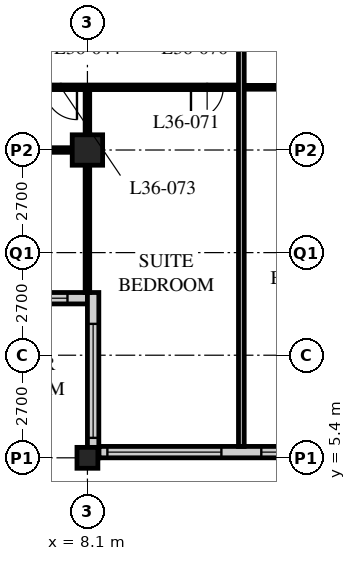
"""IFC4 building model, lengths in metres.
Left out: names, types, materials, properties, quantities, classifications, styles, units other than length and angle.
Written with IfcOpenShell. Run it as: python <this file> out.ifc"""

import sys

from ifc_helpers import new_model, si_unit, direction, frame, frame_2d, origin, origin_2d, place, context, subcontext, project, spatial, rectangle, hollow_rectangle, extrude, element, fill, save


model = new_model("IFC4")
c1 = context("Model", 3, precision=1e-05, world=origin(), true_north=direction((0.0, 1.0)))
c2 = subcontext(c1, "Body", "Model", "MODEL_VIEW")
j1 = project(units=[si_unit("LENGTHUNIT", "METRE"), si_unit("PLANEANGLEUNIT", "RADIAN")], contexts=[c1])
p1 = place(None, origin())
s1 = spatial("IfcSite", under=j1, at=p1, CompositionType="ELEMENT")
p2 = place(p1, origin())
s2 = spatial("IfcBuilding", under=s1, at=p2, CompositionType="ELEMENT")
p3 = place(p2, frame((0.0, 0.0, 140.8)))
s3 = spatial("IfcBuildingStorey", under=s2, at=p3, CompositionType="ELEMENT", Elevation=140.8)
p4 = place(p3, frame((8.1, 5.4, 0.0), z_axis=(0.0, 0.0, 1.0), x_axis=(1.0, 0.0, 0.0)))
e1 = element("IfcColumn", 1, at=p4, inside=s3, PredefinedType="COLUMN", context=c2, shape_type="SweptSolid", body=[
    extrude(hollow_rectangle(XDim=0.55, YDim=0.55, WallThickness=0.04, at=origin_2d()), origin(), (0.0, 0.0, 1.0), 3.4),
])
p5 = place(p3, frame((8.1, 13.5, 0.0), z_axis=(0.0, 0.0, 1.0), x_axis=(1.0, 0.0, 0.0)))
e2 = element("IfcColumn", 2, at=p5, inside=s3, PredefinedType="COLUMN", context=c2, shape_type="SweptSolid", body=[
    extrude(hollow_rectangle(XDim=0.8, YDim=0.8, WallThickness=0.08, at=origin_2d()), origin(), (0.0, 0.0, 1.0), 3.4),
])
p6 = place(p3, frame((8.4, 5.55, 0.0), z_axis=(0.0, 0.0, 1.0), x_axis=(1.0, 0.0, 0.0)))
e3 = element("IfcWall", 3, at=p6, inside=s3, PredefinedType="SOLIDWALL", context=c2, shape_type="SweptSolid", body=[
    extrude(rectangle(XDim=40.2, YDim=0.3, at=frame_2d((20.1, 0.0))), origin(), (0.0, 0.0, 1.0), 3.19),
])
p7 = place(p6, frame((0.225, 0.0, 0.9)))
e4 = element("IfcOpeningElement", 4, at=p7, cuts=e3, PredefinedType="OPENING", context=c2, shape_type="SweptSolid", body=[
    extrude(rectangle(XDim=3.0, YDim=2.0, at=frame_2d((1.5, 1.0))), frame((0.0, 0.16, 0.0), z_axis=(0.0, -1.0, 0.0), x_axis=(1.0, 0.0, 0.0)), (0.0, 0.0, 1.0), 0.32),
])
p8 = place(p6, frame((4.275, 0.0, 0.9)))
e5 = element("IfcOpeningElement", 5, at=p8, cuts=e3, PredefinedType="OPENING", context=c2, shape_type="SweptSolid", body=[
    extrude(rectangle(XDim=3.0, YDim=2.0, at=frame_2d((1.5, 1.0))), frame((0.0, 0.16, 0.0), z_axis=(0.0, -1.0, 0.0), x_axis=(1.0, 0.0, 0.0)), (0.0, 0.0, 1.0), 0.32),
])
p9 = place(p6, frame((8.325, 0.0, 0.9)))
e6 = element("IfcOpeningElement", 6, at=p9, cuts=e3, PredefinedType="OPENING", context=c2, shape_type="SweptSolid", body=[
    extrude(rectangle(XDim=3.0, YDim=2.0, at=frame_2d((1.5, 1.0))), frame((0.0, 0.16, 0.0), z_axis=(0.0, -1.0, 0.0), x_axis=(1.0, 0.0, 0.0)), (0.0, 0.0, 1.0), 0.32),
])
p10 = place(p6, frame((12.375, 0.0, 0.9)))
e7 = element("IfcOpeningElement", 7, at=p10, cuts=e3, PredefinedType="OPENING", context=c2, shape_type="SweptSolid", body=[
    extrude(rectangle(XDim=3.0, YDim=2.0, at=frame_2d((1.5, 1.0))), frame((0.0, 0.16, 0.0), z_axis=(0.0, -1.0, 0.0), x_axis=(1.0, 0.0, 0.0)), (0.0, 0.0, 1.0), 0.32),
])
p11 = place(p6, frame((16.425, 0.0, 0.9)))
e8 = element("IfcOpeningElement", 8, at=p11, cuts=e3, PredefinedType="OPENING", context=c2, shape_type="SweptSolid", body=[
    extrude(rectangle(XDim=3.0, YDim=2.0, at=frame_2d((1.5, 1.0))), frame((0.0, 0.16, 0.0), z_axis=(0.0, -1.0, 0.0), x_axis=(1.0, 0.0, 0.0)), (0.0, 0.0, 1.0), 0.32),
])
p12 = place(p6, frame((20.475, 0.0, 0.9)))
e9 = element("IfcOpeningElement", 9, at=p12, cuts=e3, PredefinedType="OPENING", context=c2, shape_type="SweptSolid", body=[
    extrude(rectangle(XDim=3.0, YDim=2.0, at=frame_2d((1.5, 1.0))), frame((0.0, 0.16, 0.0), z_axis=(0.0, -1.0, 0.0), x_axis=(1.0, 0.0, 0.0)), (0.0, 0.0, 1.0), 0.32),
])
p13 = place(p6, frame((24.525, 0.0, 0.9)))
e10 = element("IfcOpeningElement", 10, at=p13, cuts=e3, PredefinedType="OPENING", context=c2, shape_type="SweptSolid", body=[
    extrude(rectangle(XDim=3.0, YDim=2.0, at=frame_2d((1.5, 1.0))), frame((0.0, 0.16, 0.0), z_axis=(0.0, -1.0, 0.0), x_axis=(1.0, 0.0, 0.0)), (0.0, 0.0, 1.0), 0.32),
])
p14 = place(p6, frame((28.575, 0.0, 0.9)))
e11 = element("IfcOpeningElement", 11, at=p14, cuts=e3, PredefinedType="OPENING", context=c2, shape_type="SweptSolid", body=[
    extrude(rectangle(XDim=3.0, YDim=2.0, at=frame_2d((1.5, 1.0))), frame((0.0, 0.16, 0.0), z_axis=(0.0, -1.0, 0.0), x_axis=(1.0, 0.0, 0.0)), (0.0, 0.0, 1.0), 0.32),
])
p15 = place(p6, frame((32.625, 0.0, 0.9)))
e12 = element("IfcOpeningElement", 12, at=p15, cuts=e3, PredefinedType="OPENING", context=c2, shape_type="SweptSolid", body=[
    extrude(rectangle(XDim=3.0, YDim=2.0, at=frame_2d((1.5, 1.0))), frame((0.0, 0.16, 0.0), z_axis=(0.0, -1.0, 0.0), x_axis=(1.0, 0.0, 0.0)), (0.0, 0.0, 1.0), 0.32),
])
p16 = place(p6, frame((36.675, 0.0, 0.9)))
e13 = element("IfcOpeningElement", 13, at=p16, cuts=e3, PredefinedType="OPENING", context=c2, shape_type="SweptSolid", body=[
    extrude(rectangle(XDim=3.0, YDim=2.0, at=frame_2d((1.5, 1.0))), frame((0.0, 0.16, 0.0), z_axis=(0.0, -1.0, 0.0), x_axis=(1.0, 0.0, 0.0)), (0.0, 0.0, 1.0), 0.32),
])
p17 = place(p3, frame((4.35, 9.6, 0.0), z_axis=(0.0, 0.0, 1.0), x_axis=(1.0, 0.0, 0.0)))
e14 = element("IfcWall", 14, at=p17, inside=s3, PredefinedType="SOLIDWALL", context=c2, shape_type="SweptSolid", body=[
    extrude(rectangle(XDim=3.75, YDim=0.3, at=frame_2d((1.875, 0.0))), origin(), (0.0, 0.0, 1.0), 3.19),
])
p18 = place(p17, frame((0.225, 0.0, 0.9)))
e15 = element("IfcOpeningElement", 15, at=p18, cuts=e14, PredefinedType="OPENING", context=c2, shape_type="SweptSolid", body=[
    extrude(rectangle(XDim=3.0, YDim=1.5, at=frame_2d((1.5, 0.75))), frame((0.0, 0.16, 0.0), z_axis=(0.0, -1.0, 0.0), x_axis=(1.0, 0.0, 0.0)), (0.0, 0.0, 1.0), 0.32),
])
p19 = place(p3, frame((8.25, 9.75, 0.0), z_axis=(0.0, 0.0, 1.0), x_axis=(0.0, -1.0, 0.0)))
e16 = element("IfcWall", 16, at=p19, inside=s3, PredefinedType="SOLIDWALL", context=c2, shape_type="SweptSolid", body=[
    extrude(rectangle(XDim=4.35, YDim=0.3, at=frame_2d((2.175, 0.0))), origin(), (0.0, 0.0, 1.0), 3.19),
])
p20 = place(p19, frame((0.825, 0.0, 0.9)))
e17 = element("IfcOpeningElement", 17, at=p20, cuts=e16, PredefinedType="OPENING", context=c2, shape_type="SweptSolid", body=[
    extrude(rectangle(XDim=3.0, YDim=1.5, at=frame_2d((1.5, 0.75))), frame((0.0, 0.16, 0.0), z_axis=(0.0, -1.0, 0.0), x_axis=(1.0, 0.0, 0.0)), (0.0, 0.0, 1.0), 0.32),
])
p21 = place(p3, frame((12.15, 15.15, 0.0), z_axis=(0.0, 0.0, 1.0), x_axis=(1.0, 0.0, 0.0)))
e18 = element("IfcWall", 18, at=p21, inside=s3, PredefinedType="PARTITIONING", context=c2, shape_type="SweptSolid", body=[
    extrude(rectangle(XDim=2.6, YDim=0.1, at=frame_2d((1.3, 0.0))), origin(), (0.0, 0.0, 1.0), 3.19),
])
p22 = place(p3, frame((4.1, 15.15, 0.0), z_axis=(0.0, 0.0, 1.0), x_axis=(1.0, 0.0, 0.0)))
e19 = element("IfcWall", 19, at=p22, inside=s3, PredefinedType="PARTITIONING", context=c2, shape_type="SweptSolid", body=[
    extrude(rectangle(XDim=8.05, YDim=0.12, at=frame_2d((4.025, 0.0))), origin(), (0.0, 0.0, 1.0), 3.19),
])
p23 = place(p22, frame((6.725, 0.0, 0.0)))
e20 = element("IfcOpeningElement", 20, at=p23, cuts=e19, PredefinedType="OPENING", context=c2, shape_type="SweptSolid", body=[
    extrude(rectangle(XDim=0.85, YDim=2.1, at=frame_2d((0.425, 1.05))), frame((0.0, 0.07, 0.0), z_axis=(0.0, -1.0, 0.0), x_axis=(1.0, 0.0, 0.0)), (0.0, 0.0, 1.0), 0.14),
])
p24 = place(p22, frame((2.875, 0.0, 0.0)))
e21 = element("IfcOpeningElement", 21, at=p24, cuts=e19, PredefinedType="OPENING", context=c2, shape_type="SweptSolid", body=[
    extrude(rectangle(XDim=0.85, YDim=2.1, at=frame_2d((0.425, 1.05))), frame((0.0, 0.07, 0.0), z_axis=(0.0, -1.0, 0.0), x_axis=(1.0, 0.0, 0.0)), (0.0, 0.0, 1.0), 0.14),
])
p25 = place(p3, frame((8.1, 15.15, 0.0), z_axis=(0.0, 0.0, 1.0), x_axis=(0.0, -1.0, 0.0)))
e22 = element("IfcWall", 22, at=p25, inside=s3, PredefinedType="PARTITIONING", context=c2, shape_type="SweptSolid", body=[
    extrude(rectangle(XDim=5.4, YDim=0.12, at=frame_2d((2.7, 0.0))), origin(), (0.0, 0.0, 1.0), 2.578),
])
p26 = place(p3, frame((8.1, 13.5, 0.0), z_axis=(0.0, 0.0, 1.0), x_axis=(-1.0, 0.0, 0.0)))
e23 = element("IfcWall", 23, at=p26, inside=s3, PredefinedType="PARTITIONING", context=c2, shape_type="SweptSolid", body=[
    extrude(rectangle(XDim=3.75, YDim=0.12, at=frame_2d((1.875, 0.0))), origin(), (0.0, 0.0, 1.0), 2.578),
])
p27 = place(p26, frame((1.875, 0.0, 0.0)))
e24 = element("IfcOpeningElement", 24, at=p27, cuts=e23, PredefinedType="OPENING", context=c2, shape_type="SweptSolid", body=[
    extrude(rectangle(XDim=0.85, YDim=2.1, at=frame_2d((0.425, 1.05))), frame((0.0, 0.07, 0.0), z_axis=(0.0, -1.0, 0.0), x_axis=(1.0, 0.0, 0.0)), (0.0, 0.0, 1.0), 0.14),
])
p28 = place(p3, frame((12.15, 17.55, 0.0), z_axis=(0.0, 0.0, 1.0), x_axis=(0.0, -1.0, 0.0)))
e25 = element("IfcWall", 25, at=p28, inside=s3, PredefinedType="PARTITIONING", context=c2, shape_type="SweptSolid", body=[
    extrude(rectangle(XDim=11.85, YDim=0.15, at=frame_2d((5.925, 0.0))), origin(), (0.0, 0.0, 1.0), 3.19),
])
p29 = place(p7, origin())
e26 = element("IfcWindow", 26, at=p29, inside=s3, PartitioningType="SINGLE_PANEL", PredefinedType="WINDOW", context=c2, shape_type="SweptSolid", body=[
    extrude(rectangle(XDim=3.0, YDim=2.0, at=frame_2d((1.5, 1.0))), frame((0.0, 0.03, 0.0), z_axis=(0.0, -1.0, 0.0), x_axis=(1.0, 0.0, 0.0)), (0.0, 0.0, 1.0), 0.06),
])
fill(e4, e26)
p30 = place(p8, origin())
e27 = element("IfcWindow", 27, at=p30, inside=s3, PartitioningType="SINGLE_PANEL", PredefinedType="WINDOW", context=c2, shape_type="SweptSolid", body=[
    extrude(rectangle(XDim=3.0, YDim=2.0, at=frame_2d((1.5, 1.0))), frame((0.0, 0.03, 0.0), z_axis=(0.0, -1.0, 0.0), x_axis=(1.0, 0.0, 0.0)), (0.0, 0.0, 1.0), 0.06),
])
fill(e5, e27)
p31 = place(p18, origin())
e28 = element("IfcWindow", 28, at=p31, inside=s3, PartitioningType="SINGLE_PANEL", PredefinedType="WINDOW", context=c2, shape_type="SweptSolid", body=[
    extrude(rectangle(XDim=3.0, YDim=1.5, at=frame_2d((1.5, 0.75))), frame((0.0, 0.03, 0.0), z_axis=(0.0, -1.0, 0.0), x_axis=(1.0, 0.0, 0.0)), (0.0, 0.0, 1.0), 0.06),
])
fill(e15, e28)
p32 = place(p20, origin())
e29 = element("IfcWindow", 29, at=p32, inside=s3, PartitioningType="SINGLE_PANEL", PredefinedType="WINDOW", context=c2, shape_type="SweptSolid", body=[
    extrude(rectangle(XDim=3.0, YDim=1.5, at=frame_2d((1.5, 0.75))), frame((0.0, 0.03, 0.0), z_axis=(0.0, -1.0, 0.0), x_axis=(1.0, 0.0, 0.0)), (0.0, 0.0, 1.0), 0.06),
])
fill(e17, e29)
p33 = place(p23, origin())
e30 = element("IfcDoor", 30, at=p33, inside=s3, OperationType="SINGLE_SWING_RIGHT", PredefinedType="DOOR", context=c2, shape_type="SweptSolid", body=[
    extrude(rectangle(XDim=0.85, YDim=2.1, at=frame_2d((0.425, 1.05))), frame((0.0, 0.025, 0.0), z_axis=(0.0, -1.0, 0.0), x_axis=(1.0, 0.0, 0.0)), (0.0, 0.0, 1.0), 0.05),
])
fill(e20, e30)
p34 = place(p24, origin())
e31 = element("IfcDoor", 31, at=p34, inside=s3, OperationType="SINGLE_SWING_LEFT", PredefinedType="DOOR", context=c2, shape_type="SweptSolid", body=[
    extrude(rectangle(XDim=0.85, YDim=2.1, at=frame_2d((0.425, 1.05))), frame((0.0, 0.025, 0.0), z_axis=(0.0, -1.0, 0.0), x_axis=(1.0, 0.0, 0.0)), (0.0, 0.0, 1.0), 0.05),
])
fill(e21, e31)
save(model, sys.argv[1])
